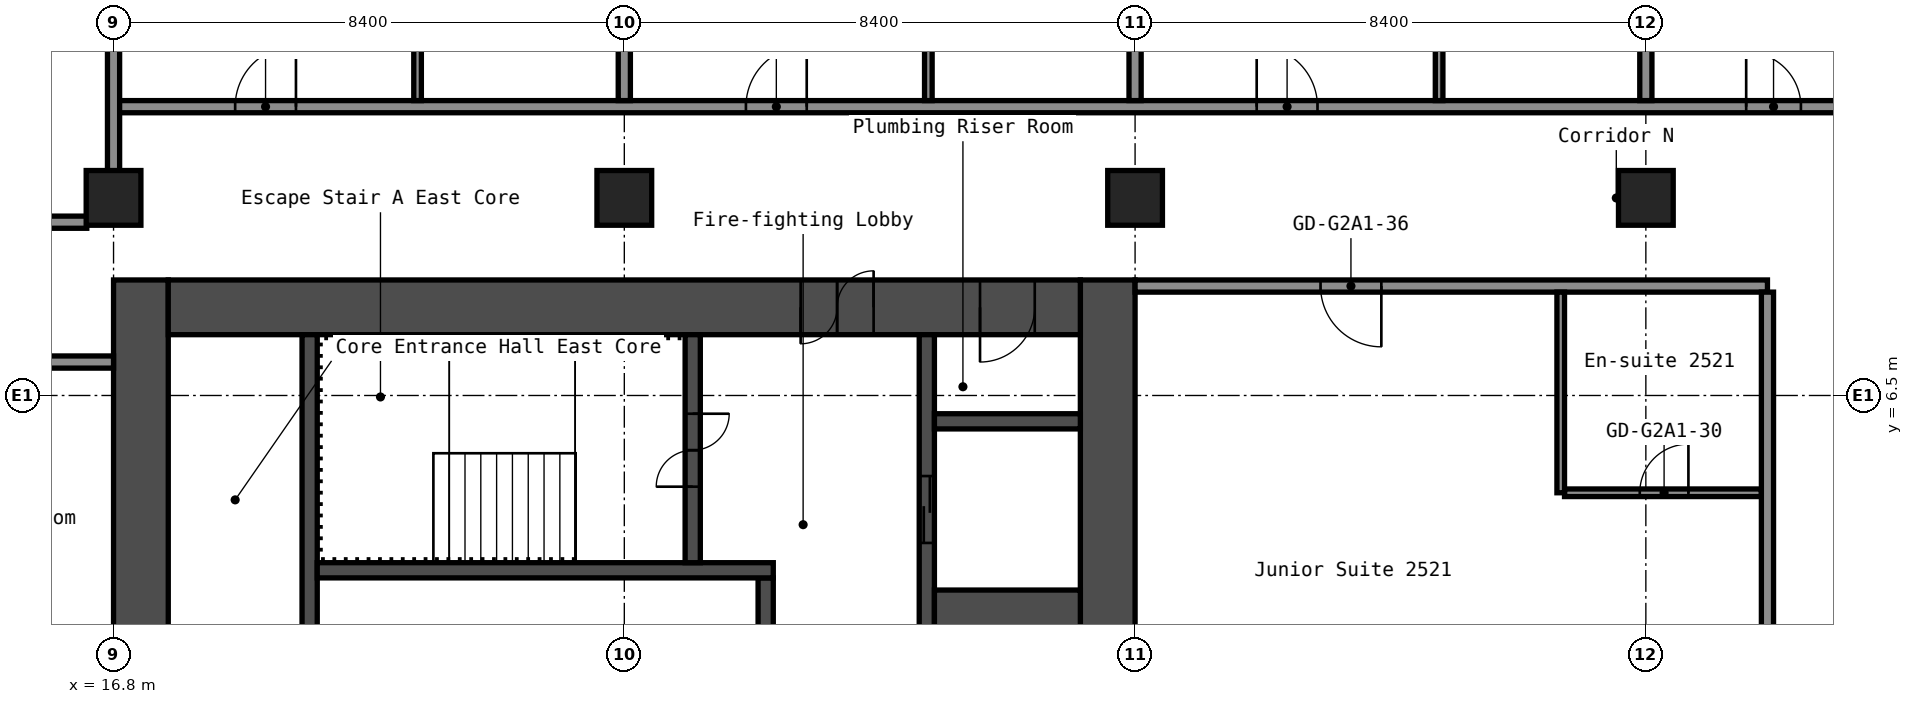
"""IFC4 building model, lengths in metres.
Left out: names, types, materials, properties, quantities, classifications, styles, units other than length and angle.
Written with IfcOpenShell. Run it as: python <this file> out.ifc"""

import sys

from ifc_helpers import new_model, si_unit, direction, frame, frame_2d, origin, origin_2d, place, context, subcontext, project, spatial, rectangle, hollow_rectangle, extrude, element, fill, save


model = new_model("IFC4")
c1 = context("Model", 3, precision=1e-05, world=origin(), true_north=direction((0.0, 1.0)))
c2 = subcontext(c1, "Body", "Model", "MODEL_VIEW")
j1 = project(units=[si_unit("LENGTHUNIT", "METRE"), si_unit("PLANEANGLEUNIT", "RADIAN")], contexts=[c1])
p1 = place(None, origin())
s1 = spatial("IfcSite", under=j1, at=p1, CompositionType="ELEMENT")
p2 = place(p1, origin())
s2 = spatial("IfcBuilding", under=s1, at=p2, CompositionType="ELEMENT")
p3 = place(p2, frame((0.0, 0.0, 91.4)))
s3 = spatial("IfcBuildingStorey", under=s2, at=p3, CompositionType="ELEMENT", Elevation=91.4)
for number, where, z_axis, x_axis in (
    (1, (16.8, 9.75, 0.0), (0.0, 0.0, 1.0), (1.0, 0.0, 0.0)),
    (2, (25.2, 9.75, 0.0), (0.0, 0.0, 1.0), (1.0, 0.0, 0.0)),
    (3, (33.6, 9.75, 0.0), (0.0, 0.0, 1.0), (1.0, 0.0, 0.0)),
    (4, (42.0, 9.75, 0.0), (0.0, 0.0, 1.0), (1.0, 0.0, 0.0)),
):
    element("IfcColumn", number, at=place(p3, frame(where, z_axis=z_axis, x_axis=x_axis)), inside=s3, PredefinedType="COLUMN", context=c2, shape_type="SweptSolid", body=[
        extrude(hollow_rectangle(XDim=0.9, YDim=0.9, WallThickness=0.036, at=origin_2d()), origin(), (0.0, 0.0, 1.0), 2.8),
    ])
p4 = place(p3, frame((17.25, -8.4, 0.0), z_axis=(0.0, 0.0, 1.0), x_axis=(0.0, 1.0, 0.0)))
e5 = element("IfcWall", 5, at=p4, inside=s3, PredefinedType="SHEAR", context=c2, shape_type="SweptSolid", body=[
    extrude(rectangle(XDim=16.8, YDim=0.9, at=frame_2d((8.4, 0.0))), origin(), (0.0, 0.0, 1.0), 2.8),
])
p5 = place(p4, frame((7.6, 0.0, 0.0)))
e6 = element("IfcOpeningElement", 6, at=p5, cuts=e5, PredefinedType="OPENING", context=c2, shape_type="SweptSolid", body=[
    extrude(rectangle(XDim=1.2, YDim=2.1, at=frame_2d((0.6, 1.05))), frame((0.0, 0.46, 0.0), z_axis=(0.0, -1.0, 0.0), x_axis=(1.0, 0.0, 0.0)), (0.0, 0.0, 1.0), 0.92),
])
p6 = place(p3, frame((33.15, -8.4, 0.0), z_axis=(0.0, 0.0, 1.0), x_axis=(0.0, 1.0, 0.0)))
e7 = element("IfcWall", 7, at=p6, inside=s3, PredefinedType="SHEAR", context=c2, shape_type="SweptSolid", body=[
    extrude(rectangle(XDim=16.8, YDim=0.9, at=frame_2d((8.4, 0.0))), origin(), (0.0, 0.0, 1.0), 2.8),
])
p7 = place(p3, frame((17.7, 7.95, 0.0), z_axis=(0.0, 0.0, 1.0), x_axis=(1.0, 0.0, 0.0)))
e8 = element("IfcWall", 8, at=p7, inside=s3, PredefinedType="SHEAR", context=c2, shape_type="SweptSolid", body=[
    extrude(rectangle(XDim=15.0, YDim=0.9, at=frame_2d((7.5, 0.0))), origin(), (0.0, 0.0, 1.0), 2.8),
])
p8 = place(p7, frame((10.4, 0.0, 0.0)))
e9 = element("IfcOpeningElement", 9, at=p8, cuts=e8, PredefinedType="OPENING", context=c2, shape_type="SweptSolid", body=[
    extrude(rectangle(XDim=1.2, YDim=2.1, at=frame_2d((0.6, 1.05))), frame((0.0, 0.46, 0.0), z_axis=(0.0, -1.0, 0.0), x_axis=(1.0, 0.0, 0.0)), (0.0, 0.0, 1.0), 0.92),
])
p9 = place(p7, frame((13.35, 0.0, 0.0)))
e10 = element("IfcOpeningElement", 10, at=p9, cuts=e8, PredefinedType="OPENING", context=c2, shape_type="SweptSolid", body=[
    extrude(rectangle(XDim=0.9, YDim=2.1, at=frame_2d((0.45, 1.05))), frame((0.0, 0.46, 0.0), z_axis=(0.0, -1.0, 0.0), x_axis=(1.0, 0.0, 0.0)), (0.0, 0.0, 1.0), 0.92),
])
p10 = place(p3, frame((20.025, 1.2, 0.0), z_axis=(0.0, 0.0, 1.0), x_axis=(0.0, 1.0, 0.0)))
e11 = element("IfcWall", 11, at=p10, inside=s3, PredefinedType="SHEAR", context=c2, shape_type="SweptSolid", body=[
    extrude(rectangle(XDim=6.3, YDim=0.25, at=frame_2d((3.15, 0.0))), origin(), (0.0, 0.0, 1.0), 2.8),
])
p11 = place(p3, frame((27.525, 1.45, 0.0), z_axis=(0.0, 0.0, 1.0), x_axis=(0.0, 1.0, 0.0)))
e12 = element("IfcWall", 12, at=p11, inside=s3, PredefinedType="SHEAR", context=c2, shape_type="SweptSolid", body=[
    extrude(rectangle(XDim=2.05, YDim=0.25, at=frame_2d((1.025, 0.0))), origin(), (0.0, 0.0, 1.0), 2.8),
])
p12 = place(p3, frame((20.15, 3.625, 0.0), z_axis=(0.0, 0.0, 1.0), x_axis=(1.0, 0.0, 0.0)))
e13 = element("IfcWall", 13, at=p12, inside=s3, PredefinedType="SHEAR", context=c2, shape_type="SweptSolid", body=[
    extrude(rectangle(XDim=7.5, YDim=0.25, at=frame_2d((3.75, 0.0))), origin(), (0.0, 0.0, 1.0), 2.8),
])
p13 = place(p3, frame((26.325, 3.75, 0.0), z_axis=(0.0, 0.0, 1.0), x_axis=(0.0, 1.0, 0.0)))
e14 = element("IfcWall", 14, at=p13, inside=s3, PredefinedType="SHEAR", context=c2, shape_type="SweptSolid", body=[
    extrude(rectangle(XDim=3.75, YDim=0.25, at=frame_2d((1.875, 0.0))), origin(), (0.0, 0.0, 1.0), 2.8),
])
p14 = place(p13, frame((1.25, 0.0, 0.0)))
e15 = element("IfcOpeningElement", 15, at=p14, cuts=e14, PredefinedType="OPENING", context=c2, shape_type="SweptSolid", body=[
    extrude(rectangle(XDim=1.2, YDim=2.1, at=frame_2d((0.6, 1.05))), frame((0.0, 0.135, 0.0), z_axis=(0.0, -1.0, 0.0), x_axis=(1.0, 0.0, 0.0)), (0.0, 0.0, 1.0), 0.27),
])
p15 = place(p3, frame((30.175, 1.45, 0.0), z_axis=(0.0, 0.0, 1.0), x_axis=(0.0, 1.0, 0.0)))
e16 = element("IfcWall", 16, at=p15, inside=s3, PredefinedType="SHEAR", context=c2, shape_type="SweptSolid", body=[
    extrude(rectangle(XDim=6.05, YDim=0.25, at=frame_2d((3.025, 0.0))), origin(), (0.0, 0.0, 1.0), 2.8),
])
p16 = place(p15, frame((2.625, 0.0, 0.0)))
e17 = element("IfcOpeningElement", 17, at=p16, cuts=e16, PredefinedType="OPENING", context=c2, shape_type="SweptSolid", body=[
    extrude(rectangle(XDim=1.1, YDim=2.1, at=frame_2d((0.55, 1.05))), frame((0.0, 0.135, 0.0), z_axis=(0.0, -1.0, 0.0), x_axis=(1.0, 0.0, 0.0)), (0.0, 0.0, 1.0), 0.27),
])
p17 = place(p3, frame((30.3, 2.375, 0.0), z_axis=(0.0, 0.0, 1.0), x_axis=(1.0, 0.0, 0.0)))
e18 = element("IfcWall", 18, at=p17, inside=s3, PredefinedType="SHEAR", context=c2, shape_type="SweptSolid", body=[
    extrude(rectangle(XDim=2.4, YDim=1.85, at=frame_2d((1.2, 0.0))), origin(), (0.0, 0.0, 1.0), 2.8),
])
p18 = place(p3, frame((30.3, 6.075, 0.0), z_axis=(0.0, 0.0, 1.0), x_axis=(1.0, 0.0, 0.0)))
e19 = element("IfcWall", 19, at=p18, inside=s3, PredefinedType="SHEAR", context=c2, shape_type="SweptSolid", body=[
    extrude(rectangle(XDim=2.4, YDim=0.25, at=frame_2d((1.2, 0.0))), origin(), (0.0, 0.0, 1.0), 2.8),
])
p19 = place(p3, frame((40.663, 4.9, 0.0), z_axis=(0.0, 0.0, 1.0), x_axis=(1.0, 0.0, 0.0)))
e20 = element("IfcWall", 20, at=p19, inside=s3, PredefinedType="PARTITIONING", context=c2, shape_type="SweptSolid", body=[
    extrude(rectangle(XDim=3.237, YDim=0.125, at=frame_2d((1.619, 0.0))), origin(), (0.0, 0.0, 1.0), 2.8),
])
p20 = place(p19, frame((1.238, 0.0, 0.0)))
e21 = element("IfcOpeningElement", 21, at=p20, cuts=e20, PredefinedType="OPENING", context=c2, shape_type="SweptSolid", body=[
    extrude(rectangle(XDim=0.8, YDim=2.1, at=frame_2d((0.4, 1.05))), frame((0.0, 0.073, 0.0), z_axis=(0.0, -1.0, 0.0), x_axis=(1.0, 0.0, 0.0)), (0.0, 0.0, 1.0), 0.145),
])
p21 = place(p3, frame((-16.8, 7.05, 0.0), z_axis=(0.0, 0.0, 1.0), x_axis=(1.0, 0.0, 0.0)))
e22 = element("IfcWall", 22, at=p21, inside=s3, PredefinedType="PARTITIONING", context=c2, shape_type="SweptSolid", body=[
    extrude(rectangle(XDim=33.6, YDim=0.2, at=frame_2d((16.8, 0.0))), origin(), (0.0, 0.0, 1.0), 2.8),
])
p22 = place(p21, frame((1.82, 0.0, 0.0)))
e23 = element("IfcOpeningElement", 23, at=p22, cuts=e22, PredefinedType="OPENING", context=c2, shape_type="SweptSolid", body=[
    extrude(rectangle(XDim=0.9, YDim=2.1, at=frame_2d((0.45, 1.05))), frame((0.0, 0.11, 0.0), z_axis=(0.0, -1.0, 0.0), x_axis=(1.0, 0.0, 0.0)), (0.0, 0.0, 1.0), 0.22),
])
p23 = place(p21, frame((6.02, 0.0, 0.0)))
e24 = element("IfcOpeningElement", 24, at=p23, cuts=e22, PredefinedType="OPENING", context=c2, shape_type="SweptSolid", body=[
    extrude(rectangle(XDim=0.9, YDim=2.1, at=frame_2d((0.45, 1.05))), frame((0.0, 0.11, 0.0), z_axis=(0.0, -1.0, 0.0), x_axis=(1.0, 0.0, 0.0)), (0.0, 0.0, 1.0), 0.22),
])
p24 = place(p21, frame((18.955, 0.0, 0.0)))
e25 = element("IfcOpeningElement", 25, at=p24, cuts=e22, PredefinedType="OPENING", context=c2, shape_type="SweptSolid", body=[
    extrude(rectangle(XDim=0.9, YDim=2.1, at=frame_2d((0.45, 1.05))), frame((0.0, 0.11, 0.0), z_axis=(0.0, -1.0, 0.0), x_axis=(1.0, 0.0, 0.0)), (0.0, 0.0, 1.0), 0.22),
])
p25 = place(p21, frame((23.155, 0.0, 0.0)))
e26 = element("IfcOpeningElement", 26, at=p25, cuts=e22, PredefinedType="OPENING", context=c2, shape_type="SweptSolid", body=[
    extrude(rectangle(XDim=0.9, YDim=2.1, at=frame_2d((0.45, 1.05))), frame((0.0, 0.11, 0.0), z_axis=(0.0, -1.0, 0.0), x_axis=(1.0, 0.0, 0.0)), (0.0, 0.0, 1.0), 0.22),
])
p26 = place(p3, frame((33.6, 8.3, 0.0), z_axis=(0.0, 0.0, 1.0), x_axis=(1.0, 0.0, 0.0)))
e27 = element("IfcWall", 27, at=p26, inside=s3, PredefinedType="PARTITIONING", context=c2, shape_type="SweptSolid", body=[
    extrude(rectangle(XDim=10.4, YDim=0.2, at=frame_2d((5.2, 0.0))), origin(), (0.0, 0.0, 1.0), 2.8),
])
p27 = place(p26, frame((3.05, 0.0, 0.0)))
e28 = element("IfcOpeningElement", 28, at=p27, cuts=e27, PredefinedType="OPENING", context=c2, shape_type="SweptSolid", body=[
    extrude(rectangle(XDim=1.0, YDim=2.1, at=frame_2d((0.5, 1.05))), frame((0.0, 0.11, 0.0), z_axis=(0.0, -1.0, 0.0), x_axis=(1.0, 0.0, 0.0)), (0.0, 0.0, 1.0), 0.22),
])
p28 = place(p3, frame((-16.36, 9.35, 0.0), z_axis=(0.0, 0.0, 1.0), x_axis=(1.0, 0.0, 0.0)))
e29 = element("IfcWall", 29, at=p28, inside=s3, PredefinedType="PARTITIONING", context=c2, shape_type="SweptSolid", body=[
    extrude(rectangle(XDim=32.72, YDim=0.2, at=frame_2d((16.36, 0.0))), origin(), (0.0, 0.0, 1.0), 2.8),
])
p29 = place(p28, frame((1.46, 0.0, 0.0)))
e30 = element("IfcOpeningElement", 30, at=p29, cuts=e29, PredefinedType="OPENING", context=c2, shape_type="SweptSolid", body=[
    extrude(rectangle(XDim=0.9, YDim=2.1, at=frame_2d((0.45, 1.05))), frame((0.0, 0.11, 0.0), z_axis=(0.0, -1.0, 0.0), x_axis=(1.0, 0.0, 0.0)), (0.0, 0.0, 1.0), 0.22),
])
p30 = place(p28, frame((5.66, 0.0, 0.0)))
e31 = element("IfcOpeningElement", 31, at=p30, cuts=e29, PredefinedType="OPENING", context=c2, shape_type="SweptSolid", body=[
    extrude(rectangle(XDim=0.9, YDim=2.1, at=frame_2d((0.45, 1.05))), frame((0.0, 0.11, 0.0), z_axis=(0.0, -1.0, 0.0), x_axis=(1.0, 0.0, 0.0)), (0.0, 0.0, 1.0), 0.22),
])
p31 = place(p28, frame((9.36, 0.0, 0.0)))
e32 = element("IfcOpeningElement", 32, at=p31, cuts=e29, PredefinedType="OPENING", context=c2, shape_type="SweptSolid", body=[
    extrude(rectangle(XDim=0.9, YDim=2.1, at=frame_2d((0.45, 1.05))), frame((0.0, 0.11, 0.0), z_axis=(0.0, -1.0, 0.0), x_axis=(1.0, 0.0, 0.0)), (0.0, 0.0, 1.0), 0.22),
])
p32 = place(p28, frame((13.56, 0.0, 0.0)))
e33 = element("IfcOpeningElement", 33, at=p32, cuts=e29, PredefinedType="OPENING", context=c2, shape_type="SweptSolid", body=[
    extrude(rectangle(XDim=0.9, YDim=2.1, at=frame_2d((0.45, 1.05))), frame((0.0, 0.11, 0.0), z_axis=(0.0, -1.0, 0.0), x_axis=(1.0, 0.0, 0.0)), (0.0, 0.0, 1.0), 0.22),
])
p33 = place(p28, frame((18.6, 0.0, 0.0)))
e34 = element("IfcOpeningElement", 34, at=p33, cuts=e29, PredefinedType="OPENING", context=c2, shape_type="SweptSolid", body=[
    extrude(rectangle(XDim=0.9, YDim=2.1, at=frame_2d((0.45, 1.05))), frame((0.0, 0.11, 0.0), z_axis=(0.0, -1.0, 0.0), x_axis=(1.0, 0.0, 0.0)), (0.0, 0.0, 1.0), 0.22),
])
p34 = place(p28, frame((22.8, 0.0, 0.0)))
e35 = element("IfcOpeningElement", 35, at=p34, cuts=e29, PredefinedType="OPENING", context=c2, shape_type="SweptSolid", body=[
    extrude(rectangle(XDim=0.9, YDim=2.1, at=frame_2d((0.45, 1.05))), frame((0.0, 0.11, 0.0), z_axis=(0.0, -1.0, 0.0), x_axis=(1.0, 0.0, 0.0)), (0.0, 0.0, 1.0), 0.22),
])
p35 = place(p28, frame((26.24, 0.0, 0.0)))
e36 = element("IfcOpeningElement", 36, at=p35, cuts=e29, PredefinedType="OPENING", context=c2, shape_type="SweptSolid", body=[
    extrude(rectangle(XDim=0.9, YDim=2.1, at=frame_2d((0.45, 1.05))), frame((0.0, 0.11, 0.0), z_axis=(0.0, -1.0, 0.0), x_axis=(1.0, 0.0, 0.0)), (0.0, 0.0, 1.0), 0.22),
])
p36 = place(p28, frame((30.44, 0.0, 0.0)))
e37 = element("IfcOpeningElement", 37, at=p36, cuts=e29, PredefinedType="OPENING", context=c2, shape_type="SweptSolid", body=[
    extrude(rectangle(XDim=0.9, YDim=2.1, at=frame_2d((0.45, 1.05))), frame((0.0, 0.11, 0.0), z_axis=(0.0, -1.0, 0.0), x_axis=(1.0, 0.0, 0.0)), (0.0, 0.0, 1.0), 0.22),
])
p37 = place(p3, frame((16.8, 11.25, 0.0), z_axis=(0.0, 0.0, 1.0), x_axis=(1.0, 0.0, 0.0)))
e38 = element("IfcWall", 38, at=p37, inside=s3, PredefinedType="PARTITIONING", context=c2, shape_type="SweptSolid", body=[
    extrude(rectangle(XDim=29.7, YDim=0.2, at=frame_2d((14.85, 0.0))), origin(), (0.0, 0.0, 1.0), 2.8),
])
p38 = place(p37, frame((2.0, 0.0, 0.0)))
e39 = element("IfcOpeningElement", 39, at=p38, cuts=e38, PredefinedType="OPENING", context=c2, shape_type="SweptSolid", body=[
    extrude(rectangle(XDim=1.0, YDim=2.1, at=frame_2d((0.5, 1.05))), frame((0.0, 0.11, 0.0), z_axis=(0.0, -1.0, 0.0), x_axis=(1.0, 0.0, 0.0)), (0.0, 0.0, 1.0), 0.22),
])
p39 = place(p37, frame((10.4, 0.0, 0.0)))
e40 = element("IfcOpeningElement", 40, at=p39, cuts=e38, PredefinedType="OPENING", context=c2, shape_type="SweptSolid", body=[
    extrude(rectangle(XDim=1.0, YDim=2.1, at=frame_2d((0.5, 1.05))), frame((0.0, 0.11, 0.0), z_axis=(0.0, -1.0, 0.0), x_axis=(1.0, 0.0, 0.0)), (0.0, 0.0, 1.0), 0.22),
])
p40 = place(p37, frame((18.8, 0.0, 0.0)))
e41 = element("IfcOpeningElement", 41, at=p40, cuts=e38, PredefinedType="OPENING", context=c2, shape_type="SweptSolid", body=[
    extrude(rectangle(XDim=1.0, YDim=2.1, at=frame_2d((0.5, 1.05))), frame((0.0, 0.11, 0.0), z_axis=(0.0, -1.0, 0.0), x_axis=(1.0, 0.0, 0.0)), (0.0, 0.0, 1.0), 0.22),
])
p41 = place(p37, frame((26.85, 0.0, 0.0)))
e42 = element("IfcOpeningElement", 42, at=p41, cuts=e38, PredefinedType="OPENING", context=c2, shape_type="SweptSolid", body=[
    extrude(rectangle(XDim=0.9, YDim=2.1, at=frame_2d((0.45, 1.05))), frame((0.0, 0.11, 0.0), z_axis=(0.0, -1.0, 0.0), x_axis=(1.0, 0.0, 0.0)), (0.0, 0.0, 1.0), 0.22),
])
p42 = place(p3, frame((16.8, 10.19, 0.0), z_axis=(0.0, 0.0, 1.0), x_axis=(0.0, 1.0, 0.0)))
e43 = element("IfcWall", 43, at=p42, inside=s3, PredefinedType="PARTITIONING", context=c2, shape_type="SweptSolid", body=[
    extrude(rectangle(XDim=13.36, YDim=0.2, at=frame_2d((6.68, 0.0))), origin(), (0.0, 0.0, 1.0), 2.8),
])
p43 = place(p3, frame((21.8, 11.35, 0.0), z_axis=(0.0, 0.0, 1.0), x_axis=(0.0, 1.0, 0.0)))
e44 = element("IfcWall", 44, at=p43, inside=s3, PredefinedType="PARTITIONING", context=c2, shape_type="SweptSolid", body=[
    extrude(rectangle(XDim=3.3, YDim=0.125, at=frame_2d((1.65, 0.0))), origin(), (0.0, 0.0, 1.0), 2.8),
])
p44 = place(p3, frame((25.2, 11.35, 0.0), z_axis=(0.0, 0.0, 1.0), x_axis=(0.0, 1.0, 0.0)))
e45 = element("IfcWall", 45, at=p44, inside=s3, PredefinedType="PARTITIONING", context=c2, shape_type="SweptSolid", body=[
    extrude(rectangle(XDim=12.2, YDim=0.2, at=frame_2d((6.1, 0.0))), origin(), (0.0, 0.0, 1.0), 2.8),
])
p45 = place(p3, frame((30.2, 11.35, 0.0), z_axis=(0.0, 0.0, 1.0), x_axis=(0.0, 1.0, 0.0)))
e46 = element("IfcWall", 46, at=p45, inside=s3, PredefinedType="PARTITIONING", context=c2, shape_type="SweptSolid", body=[
    extrude(rectangle(XDim=3.3, YDim=0.125, at=frame_2d((1.65, 0.0))), origin(), (0.0, 0.0, 1.0), 2.8),
])
p46 = place(p3, frame((33.6, 11.35, 0.0), z_axis=(0.0, 0.0, 1.0), x_axis=(0.0, 1.0, 0.0)))
e47 = element("IfcWall", 47, at=p46, inside=s3, PredefinedType="PARTITIONING", context=c2, shape_type="SweptSolid", body=[
    extrude(rectangle(XDim=12.2, YDim=0.2, at=frame_2d((6.1, 0.0))), origin(), (0.0, 0.0, 1.0), 2.8),
])
p47 = place(p3, frame((38.6, 11.35, 0.0), z_axis=(0.0, 0.0, 1.0), x_axis=(0.0, 1.0, 0.0)))
e48 = element("IfcWall", 48, at=p47, inside=s3, PredefinedType="PARTITIONING", context=c2, shape_type="SweptSolid", body=[
    extrude(rectangle(XDim=3.3, YDim=0.125, at=frame_2d((1.65, 0.0))), origin(), (0.0, 0.0, 1.0), 2.8),
])
p48 = place(p3, frame((40.6, 4.9, 0.0), z_axis=(0.0, 0.0, 1.0), x_axis=(0.0, 1.0, 0.0)))
e49 = element("IfcWall", 49, at=p48, inside=s3, PredefinedType="PARTITIONING", context=c2, shape_type="SweptSolid", body=[
    extrude(rectangle(XDim=3.3, YDim=0.125, at=frame_2d((1.65, 0.0))), origin(), (0.0, 0.0, 1.0), 2.8),
])
p49 = place(p3, frame((42.0, 11.35, 0.0), z_axis=(0.0, 0.0, 1.0), x_axis=(0.0, 1.0, 0.0)))
e50 = element("IfcWall", 50, at=p49, inside=s3, PredefinedType="PARTITIONING", context=c2, shape_type="SweptSolid", body=[
    extrude(rectangle(XDim=12.2, YDim=0.2, at=frame_2d((6.1, 0.0))), origin(), (0.0, 0.0, 1.0), 2.8),
])
p50 = place(p3, frame((44.0, -8.2, 0.0), z_axis=(0.0, 0.0, 1.0), x_axis=(0.0, 1.0, 0.0)))
e51 = element("IfcWall", 51, at=p50, inside=s3, PredefinedType="PARTITIONING", context=c2, shape_type="SweptSolid", body=[
    extrude(rectangle(XDim=16.4, YDim=0.2, at=frame_2d((8.2, 0.0))), origin(), (0.0, 0.0, 1.0), 2.8),
])
p51 = place(p8, origin())
e52 = element("IfcDoor", 52, at=p51, inside=s3, OperationType="DOUBLE_DOOR_SINGLE_SWING", PredefinedType="DOOR", context=c2, shape_type="SweptSolid", body=[
    extrude(rectangle(XDim=1.2, YDim=2.1, at=frame_2d((0.6, 1.05))), frame((0.0, 0.025, 0.0), z_axis=(0.0, -1.0, 0.0), x_axis=(1.0, 0.0, 0.0)), (0.0, 0.0, 1.0), 0.05),
])
fill(e9, e52)
p52 = place(p9, origin())
e53 = element("IfcDoor", 53, at=p52, inside=s3, OperationType="SINGLE_SWING_LEFT", PredefinedType="DOOR", context=c2, shape_type="SweptSolid", body=[
    extrude(rectangle(XDim=0.9, YDim=2.1, at=frame_2d((0.45, 1.05))), frame((0.0, 0.025, 0.0), z_axis=(0.0, -1.0, 0.0), x_axis=(1.0, 0.0, 0.0)), (0.0, 0.0, 1.0), 0.05),
])
fill(e10, e53)
p53 = place(p14, origin())
e54 = element("IfcDoor", 54, at=p53, inside=s3, OperationType="DOUBLE_DOOR_SINGLE_SWING", PredefinedType="DOOR", context=c2, shape_type="SweptSolid", body=[
    extrude(rectangle(XDim=1.2, YDim=2.1, at=frame_2d((0.6, 1.05))), frame((0.0, 0.025, 0.0), z_axis=(0.0, -1.0, 0.0), x_axis=(1.0, 0.0, 0.0)), (0.0, 0.0, 1.0), 0.05),
])
fill(e15, e54)
p54 = place(p16, origin())
e55 = element("IfcDoor", 55, at=p54, inside=s3, OperationType="DOUBLE_DOOR_SLIDING", PredefinedType="DOOR", context=c2, shape_type="SweptSolid", body=[
    extrude(rectangle(XDim=1.1, YDim=2.1, at=frame_2d((0.55, 1.05))), frame((0.0, 0.025, 0.0), z_axis=(0.0, -1.0, 0.0), x_axis=(1.0, 0.0, 0.0)), (0.0, 0.0, 1.0), 0.05),
])
fill(e17, e55)
p55 = place(p20, origin())
e56 = element("IfcDoor", 56, at=p55, inside=s3, OperationType="SINGLE_SWING_LEFT", PredefinedType="DOOR", context=c2, shape_type="SweptSolid", body=[
    extrude(rectangle(XDim=0.8, YDim=2.1, at=frame_2d((0.4, 1.05))), frame((0.0, 0.025, 0.0), z_axis=(0.0, -1.0, 0.0), x_axis=(1.0, 0.0, 0.0)), (0.0, 0.0, 1.0), 0.05),
])
fill(e21, e56)
p56 = place(p27, origin())
e57 = element("IfcDoor", 57, at=p56, inside=s3, OperationType="SINGLE_SWING_RIGHT", PredefinedType="DOOR", context=c2, shape_type="SweptSolid", body=[
    extrude(rectangle(XDim=1.0, YDim=2.1, at=frame_2d((0.5, 1.05))), frame((0.0, 0.025, 0.0), z_axis=(0.0, -1.0, 0.0), x_axis=(1.0, 0.0, 0.0)), (0.0, 0.0, 1.0), 0.05),
])
fill(e28, e57)
p57 = place(p38, origin())
e58 = element("IfcDoor", 58, at=p57, inside=s3, OperationType="SINGLE_SWING_LEFT", PredefinedType="DOOR", context=c2, shape_type="SweptSolid", body=[
    extrude(rectangle(XDim=1.0, YDim=2.1, at=frame_2d((0.5, 1.05))), frame((0.0, 0.025, 0.0), z_axis=(0.0, -1.0, 0.0), x_axis=(1.0, 0.0, 0.0)), (0.0, 0.0, 1.0), 0.05),
])
fill(e39, e58)
p58 = place(p39, origin())
e59 = element("IfcDoor", 59, at=p58, inside=s3, OperationType="SINGLE_SWING_LEFT", PredefinedType="DOOR", context=c2, shape_type="SweptSolid", body=[
    extrude(rectangle(XDim=1.0, YDim=2.1, at=frame_2d((0.5, 1.05))), frame((0.0, 0.025, 0.0), z_axis=(0.0, -1.0, 0.0), x_axis=(1.0, 0.0, 0.0)), (0.0, 0.0, 1.0), 0.05),
])
fill(e40, e59)
p59 = place(p40, origin())
e60 = element("IfcDoor", 60, at=p59, inside=s3, OperationType="SINGLE_SWING_RIGHT", PredefinedType="DOOR", context=c2, shape_type="SweptSolid", body=[
    extrude(rectangle(XDim=1.0, YDim=2.1, at=frame_2d((0.5, 1.05))), frame((0.0, 0.025, 0.0), z_axis=(0.0, -1.0, 0.0), x_axis=(1.0, 0.0, 0.0)), (0.0, 0.0, 1.0), 0.05),
])
fill(e41, e60)
p60 = place(p41, origin())
e61 = element("IfcDoor", 61, at=p60, inside=s3, OperationType="SINGLE_SWING_RIGHT", PredefinedType="DOOR", context=c2, shape_type="SweptSolid", body=[
    extrude(rectangle(XDim=0.9, YDim=2.1, at=frame_2d((0.45, 1.05))), frame((0.0, 0.025, 0.0), z_axis=(0.0, -1.0, 0.0), x_axis=(1.0, 0.0, 0.0)), (0.0, 0.0, 1.0), 0.05),
])
fill(e42, e61)
save(model, sys.argv[1])
